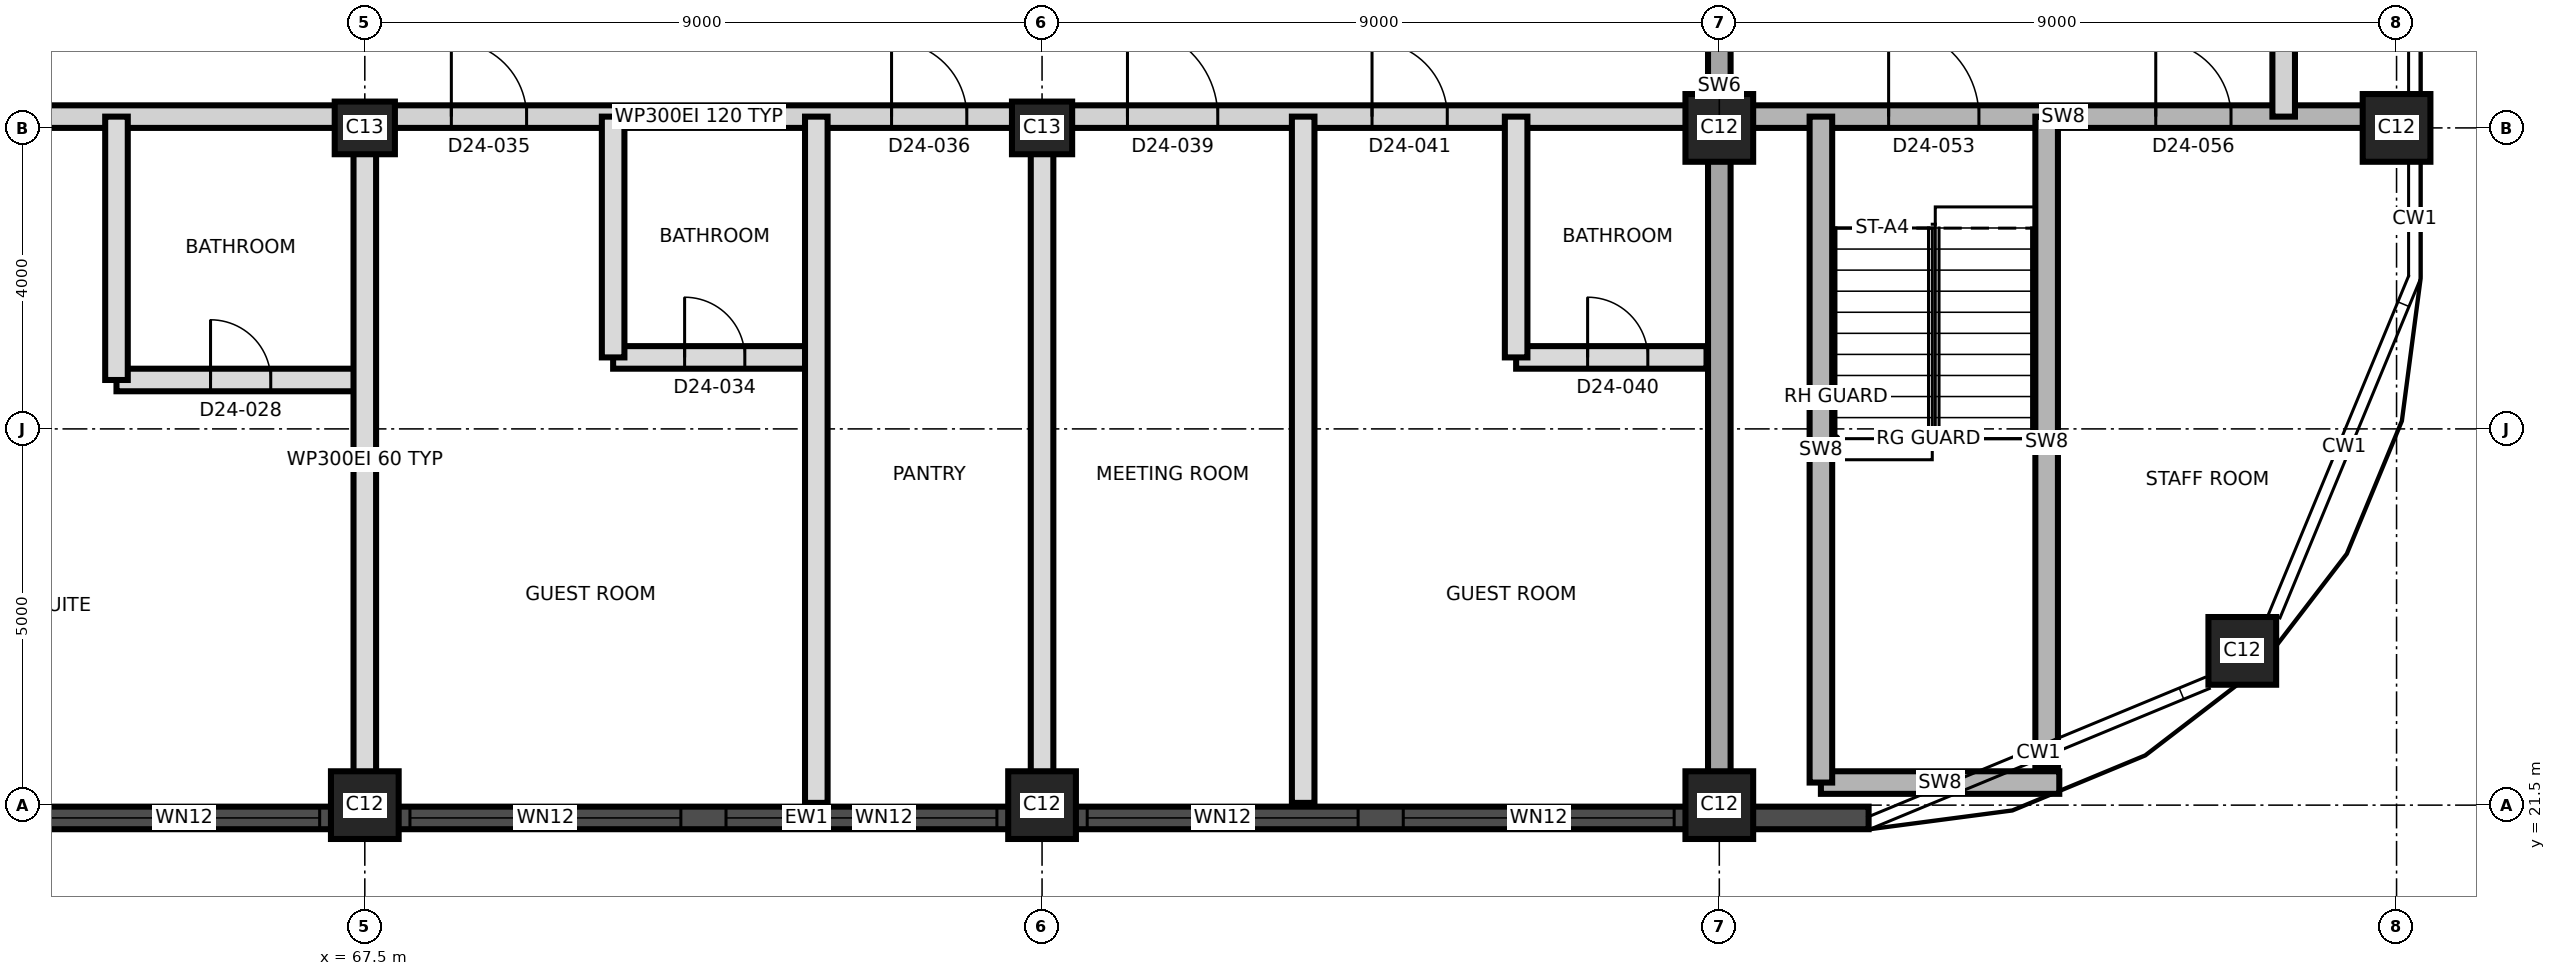
"""IFC4 building model, lengths in metres.
Left out: names, types, materials, properties, quantities, classifications, styles, units other than length and angle.
Written with IfcOpenShell. Run it as: python <this file> out.ifc"""

import sys

from ifc_helpers import new_model, si_unit, direction, frame, frame_2d, origin, origin_2d, place, context, subcontext, project, spatial, rectangle, extrude, element, fill, save


model = new_model("IFC4")
c1 = context("Model", 3, precision=1e-05, world=origin(), true_north=direction((0.0, 1.0)))
c2 = subcontext(c1, "Body", "Model", "MODEL_VIEW")
j1 = project(units=[si_unit("LENGTHUNIT", "METRE"), si_unit("PLANEANGLEUNIT", "RADIAN")], contexts=[c1])
p1 = place(None, origin())
s1 = spatial("IfcSite", under=j1, at=p1, CompositionType="ELEMENT")
p2 = place(p1, origin())
s2 = spatial("IfcBuilding", under=s1, at=p2, CompositionType="ELEMENT")
p3 = place(p2, frame((0.0, 0.0, 214.3)))
s3 = spatial("IfcBuildingStorey", under=s2, at=p3, CompositionType="ELEMENT", Elevation=214.3)
for number, where, z_axis, x_axis in (
    (1, (67.5, 21.5, 0.0), (0.0, 0.0, 1.0), (1.0, 0.0, 0.0)),
    (2, (76.5, 21.5, 0.0), (0.0, 0.0, 1.0), (1.0, 0.0, 0.0)),
    (3, (85.5, 21.5, 0.0), (0.0, 0.0, 1.0), (1.0, 0.0, 0.0)),
    (4, (92.45, 23.55, 0.0), (0.0, 0.0, 1.0), (1.0, 0.0, 0.0)),
):
    element("IfcColumn", number, at=place(p3, frame(where, z_axis=z_axis, x_axis=x_axis)), inside=s3, PredefinedType="COLUMN", context=c2, shape_type="SweptSolid", body=[
        extrude(rectangle(XDim=0.9, YDim=0.9, at=origin_2d()), origin(), (0.0, 0.0, 1.0), 3.7),
    ])
for number, where, z_axis, x_axis in (
    (5, (67.5, 30.5, 0.0), (0.0, 0.0, 1.0), (1.0, 0.0, 0.0)),
    (6, (76.5, 30.5, 0.0), (0.0, 0.0, 1.0), (1.0, 0.0, 0.0)),
):
    element("IfcColumn", number, at=place(p3, frame(where, z_axis=z_axis, x_axis=x_axis)), inside=s3, PredefinedType="COLUMN", context=c2, shape_type="SweptSolid", body=[
        extrude(rectangle(XDim=0.8, YDim=0.7, at=origin_2d()), origin(), (0.0, 0.0, 1.0), 3.7),
    ])
for number, where, z_axis, x_axis in (
    (7, (85.5, 30.5, 0.0), (0.0, 0.0, 1.0), (1.0, 0.0, 0.0)),
    (8, (94.5, 30.5, 0.0), (0.0, 0.0, 1.0), (1.0, 0.0, 0.0)),
):
    element("IfcColumn", number, at=place(p3, frame(where, z_axis=z_axis, x_axis=x_axis)), inside=s3, PredefinedType="COLUMN", context=c2, shape_type="SweptSolid", body=[
        extrude(rectangle(XDim=0.9, YDim=0.9, at=origin_2d()), origin(), (0.0, 0.0, 1.0), 3.7),
    ])
p4 = place(p3, frame((85.5, 21.53, 0.0), z_axis=(0.0, 0.0, 1.0), x_axis=(0.0, 1.0, 0.0)))
e9 = element("IfcWall", 9, at=p4, inside=s3, PredefinedType="SHEAR", context=c2, shape_type="SweptSolid", body=[
    extrude(rectangle(XDim=17.94, YDim=0.3, at=frame_2d((8.97, 0.0))), origin(), (0.0, 0.0, 1.0), 3.7),
])
p5 = place(p4, frame((10.17, 0.0, 0.0)))
e10 = element("IfcOpeningElement", 10, at=p5, cuts=e9, PredefinedType="OPENING", context=c2, shape_type="SweptSolid", body=[
    extrude(rectangle(XDim=1.4, YDim=2.1, at=frame_2d((0.7, 1.05))), frame((0.0, 0.16, 0.0), z_axis=(0.0, -1.0, 0.0), x_axis=(1.0, 0.0, 0.0)), (0.0, 0.0, 1.0), 0.32),
])
p6 = place(p3, frame((59.25, 21.33, 0.0), z_axis=(0.0, 0.0, 1.0), x_axis=(1.0, 0.0, 0.0)))
e11 = element("IfcWall", 11, at=p6, inside=s3, PredefinedType="SOLIDWALL", context=c2, shape_type="SweptSolid", body=[
    extrude(rectangle(XDim=28.234, YDim=0.3, at=frame_2d((14.117, 0.0))), origin(), (0.0, 0.0, 1.0), 3.4),
])
p7 = place(p6, frame((0.975, 0.0, 0.3)))
e12 = element("IfcOpeningElement", 12, at=p7, cuts=e11, PredefinedType="OPENING", context=c2, shape_type="SweptSolid", body=[
    extrude(rectangle(XDim=1.8, YDim=2.4, at=frame_2d((0.9, 1.2))), frame((0.0, 0.16, 0.0), z_axis=(0.0, -1.0, 0.0), x_axis=(1.0, 0.0, 0.0)), (0.0, 0.0, 1.0), 0.32),
])
p8 = place(p6, frame((4.05, 0.0, 0.9)))
e13 = element("IfcOpeningElement", 13, at=p8, cuts=e11, PredefinedType="OPENING", context=c2, shape_type="SweptSolid", body=[
    extrude(rectangle(XDim=3.6, YDim=1.5, at=frame_2d((1.8, 0.75))), frame((0.0, 0.16, 0.0), z_axis=(0.0, -1.0, 0.0), x_axis=(1.0, 0.0, 0.0)), (0.0, 0.0, 1.0), 0.32),
])
p9 = place(p6, frame((8.85, 0.0, 0.9)))
e14 = element("IfcOpeningElement", 14, at=p9, cuts=e11, PredefinedType="OPENING", context=c2, shape_type="SweptSolid", body=[
    extrude(rectangle(XDim=3.6, YDim=1.5, at=frame_2d((1.8, 0.75))), frame((0.0, 0.16, 0.0), z_axis=(0.0, -1.0, 0.0), x_axis=(1.0, 0.0, 0.0)), (0.0, 0.0, 1.0), 0.32),
])
p10 = place(p6, frame((13.05, 0.0, 0.9)))
e15 = element("IfcOpeningElement", 15, at=p10, cuts=e11, PredefinedType="OPENING", context=c2, shape_type="SweptSolid", body=[
    extrude(rectangle(XDim=3.6, YDim=1.5, at=frame_2d((1.8, 0.75))), frame((0.0, 0.16, 0.0), z_axis=(0.0, -1.0, 0.0), x_axis=(1.0, 0.0, 0.0)), (0.0, 0.0, 1.0), 0.32),
])
p11 = place(p6, frame((17.85, 0.0, 0.9)))
e16 = element("IfcOpeningElement", 16, at=p11, cuts=e11, PredefinedType="OPENING", context=c2, shape_type="SweptSolid", body=[
    extrude(rectangle(XDim=3.6, YDim=1.5, at=frame_2d((1.8, 0.75))), frame((0.0, 0.16, 0.0), z_axis=(0.0, -1.0, 0.0), x_axis=(1.0, 0.0, 0.0)), (0.0, 0.0, 1.0), 0.32),
])
p12 = place(p6, frame((22.05, 0.0, 0.9)))
e17 = element("IfcOpeningElement", 17, at=p12, cuts=e11, PredefinedType="OPENING", context=c2, shape_type="SweptSolid", body=[
    extrude(rectangle(XDim=3.6, YDim=1.5, at=frame_2d((1.8, 0.75))), frame((0.0, 0.16, 0.0), z_axis=(0.0, -1.0, 0.0), x_axis=(1.0, 0.0, 0.0)), (0.0, 0.0, 1.0), 0.32),
])
p13 = place(p3, frame((86.85, 21.8, 0.0), z_axis=(0.0, 0.0, 1.0), x_axis=(1.0, 0.0, 0.0)))
e18 = element("IfcWall", 18, at=p13, inside=s3, PredefinedType="SHEAR", context=c2, shape_type="SweptSolid", body=[
    extrude(rectangle(XDim=3.168, YDim=0.3, at=frame_2d((1.584, 0.0))), origin(), (0.0, 0.0, 1.0), 3.4),
])
p14 = place(p3, frame((64.2, 27.15, 0.0), z_axis=(0.0, 0.0, 1.0), x_axis=(1.0, 0.0, 0.0)))
e19 = element("IfcWall", 19, at=p14, inside=s3, PredefinedType="PARTITIONING", context=c2, shape_type="SweptSolid", body=[
    extrude(rectangle(XDim=3.3, YDim=0.3, at=frame_2d((1.65, 0.0))), origin(), (0.0, 0.0, 1.0), 3.4),
])
p15 = place(p14, frame((1.25, 0.0, 0.0)))
e20 = element("IfcOpeningElement", 20, at=p15, cuts=e19, PredefinedType="OPENING", context=c2, shape_type="SweptSolid", body=[
    extrude(rectangle(XDim=0.8, YDim=2.1, at=frame_2d((0.4, 1.05))), frame((0.0, 0.16, 0.0), z_axis=(0.0, -1.0, 0.0), x_axis=(1.0, 0.0, 0.0)), (0.0, 0.0, 1.0), 0.32),
])
p16 = place(p3, frame((70.8, 27.45, 0.0), z_axis=(0.0, 0.0, 1.0), x_axis=(1.0, 0.0, 0.0)))
e21 = element("IfcWall", 21, at=p16, inside=s3, PredefinedType="PARTITIONING", context=c2, shape_type="SweptSolid", body=[
    extrude(rectangle(XDim=2.7, YDim=0.3, at=frame_2d((1.35, 0.0))), origin(), (0.0, 0.0, 1.0), 3.4),
])
p17 = place(p16, frame((0.95, 0.0, 0.0)))
e22 = element("IfcOpeningElement", 22, at=p17, cuts=e21, PredefinedType="OPENING", context=c2, shape_type="SweptSolid", body=[
    extrude(rectangle(XDim=0.8, YDim=2.1, at=frame_2d((0.4, 1.05))), frame((0.0, 0.16, 0.0), z_axis=(0.0, -1.0, 0.0), x_axis=(1.0, 0.0, 0.0)), (0.0, 0.0, 1.0), 0.32),
])
p18 = place(p3, frame((82.8, 27.45, 0.0), z_axis=(0.0, 0.0, 1.0), x_axis=(1.0, 0.0, 0.0)))
e23 = element("IfcWall", 23, at=p18, inside=s3, PredefinedType="PARTITIONING", context=c2, shape_type="SweptSolid", body=[
    extrude(rectangle(XDim=2.53, YDim=0.3, at=frame_2d((1.265, 0.0))), origin(), (0.0, 0.0, 1.0), 3.4),
])
p19 = place(p18, frame((0.95, 0.0, 0.0)))
e24 = element("IfcOpeningElement", 24, at=p19, cuts=e23, PredefinedType="OPENING", context=c2, shape_type="SweptSolid", body=[
    extrude(rectangle(XDim=0.8, YDim=2.1, at=frame_2d((0.4, 1.05))), frame((0.0, 0.16, 0.0), z_axis=(0.0, -1.0, 0.0), x_axis=(1.0, 0.0, 0.0)), (0.0, 0.0, 1.0), 0.32),
])
p20 = place(p3, frame((58.55, 30.65, 0.0), z_axis=(0.0, 0.0, 1.0), x_axis=(1.0, 0.0, 0.0)))
e25 = element("IfcWall", 25, at=p20, inside=s3, PredefinedType="PARTITIONING", context=c2, shape_type="SweptSolid", body=[
    extrude(rectangle(XDim=26.78, YDim=0.3, at=frame_2d((13.39, 0.0))), origin(), (0.0, 0.0, 1.0), 3.4),
])
p21 = place(p20, frame((2.3, 0.0, 0.0)))
e26 = element("IfcOpeningElement", 26, at=p21, cuts=e25, PredefinedType="OPENING", context=c2, shape_type="SweptSolid", body=[
    extrude(rectangle(XDim=1.0, YDim=2.4, at=frame_2d((0.5, 1.2))), frame((0.0, 0.16, 0.0), z_axis=(0.0, -1.0, 0.0), x_axis=(1.0, 0.0, 0.0)), (0.0, 0.0, 1.0), 0.32),
])
p22 = place(p20, frame((10.1, 0.0, 0.0)))
e27 = element("IfcOpeningElement", 27, at=p22, cuts=e25, PredefinedType="OPENING", context=c2, shape_type="SweptSolid", body=[
    extrude(rectangle(XDim=1.0, YDim=2.1, at=frame_2d((0.5, 1.05))), frame((0.0, 0.16, 0.0), z_axis=(0.0, -1.0, 0.0), x_axis=(1.0, 0.0, 0.0)), (0.0, 0.0, 1.0), 0.32),
])
p23 = place(p20, frame((15.95, 0.0, 0.0)))
e28 = element("IfcOpeningElement", 28, at=p23, cuts=e25, PredefinedType="OPENING", context=c2, shape_type="SweptSolid", body=[
    extrude(rectangle(XDim=1.0, YDim=2.1, at=frame_2d((0.5, 1.05))), frame((0.0, 0.16, 0.0), z_axis=(0.0, -1.0, 0.0), x_axis=(1.0, 0.0, 0.0)), (0.0, 0.0, 1.0), 0.32),
])
p24 = place(p20, frame((19.085, 0.0, 0.0)))
e29 = element("IfcOpeningElement", 29, at=p24, cuts=e25, PredefinedType="OPENING", context=c2, shape_type="SweptSolid", body=[
    extrude(rectangle(XDim=1.2, YDim=2.1, at=frame_2d((0.6, 1.05))), frame((0.0, 0.16, 0.0), z_axis=(0.0, -1.0, 0.0), x_axis=(1.0, 0.0, 0.0)), (0.0, 0.0, 1.0), 0.32),
])
p25 = place(p20, frame((22.335, 0.0, 0.0)))
e30 = element("IfcOpeningElement", 30, at=p25, cuts=e25, PredefinedType="OPENING", context=c2, shape_type="SweptSolid", body=[
    extrude(rectangle(XDim=1.0, YDim=2.1, at=frame_2d((0.5, 1.05))), frame((0.0, 0.16, 0.0), z_axis=(0.0, -1.0, 0.0), x_axis=(1.0, 0.0, 0.0)), (0.0, 0.0, 1.0), 0.32),
])
p26 = place(p3, frame((85.67, 30.65, 0.0), z_axis=(0.0, 0.0, 1.0), x_axis=(1.0, 0.0, 0.0)))
e31 = element("IfcWall", 31, at=p26, inside=s3, PredefinedType="SHEAR", context=c2, shape_type="SweptSolid", body=[
    extrude(rectangle(XDim=8.8, YDim=0.3, at=frame_2d((4.4, 0.0))), origin(), (0.0, 0.0, 1.0), 3.4),
])
p27 = place(p26, frame((2.08, 0.0, 0.0)))
e32 = element("IfcOpeningElement", 32, at=p27, cuts=e31, PredefinedType="OPENING", context=c2, shape_type="SweptSolid", body=[
    extrude(rectangle(XDim=1.2, YDim=2.1, at=frame_2d((0.6, 1.05))), frame((0.0, 0.16, 0.0), z_axis=(0.0, -1.0, 0.0), x_axis=(1.0, 0.0, 0.0)), (0.0, 0.0, 1.0), 0.32),
])
p28 = place(p26, frame((5.63, 0.0, 0.0)))
e33 = element("IfcOpeningElement", 33, at=p28, cuts=e31, PredefinedType="OPENING", context=c2, shape_type="SweptSolid", body=[
    extrude(rectangle(XDim=1.0, YDim=2.1, at=frame_2d((0.5, 1.05))), frame((0.0, 0.16, 0.0), z_axis=(0.0, -1.0, 0.0), x_axis=(1.0, 0.0, 0.0)), (0.0, 0.0, 1.0), 0.32),
])
p29 = place(p3, frame((64.2, 27.15, 0.0), z_axis=(0.0, 0.0, 1.0), x_axis=(0.0, 1.0, 0.0)))
e34 = element("IfcWall", 34, at=p29, inside=s3, PredefinedType="PARTITIONING", context=c2, shape_type="SweptSolid", body=[
    extrude(rectangle(XDim=3.5, YDim=0.3, at=frame_2d((1.75, 0.0))), origin(), (0.0, 0.0, 1.0), 3.4),
])
p30 = place(p3, frame((67.5, 21.53, 0.0), z_axis=(0.0, 0.0, 1.0), x_axis=(0.0, 1.0, 0.0)))
e35 = element("IfcWall", 35, at=p30, inside=s3, PredefinedType="PARTITIONING", context=c2, shape_type="SweptSolid", body=[
    extrude(rectangle(XDim=9.12, YDim=0.3, at=frame_2d((4.56, 0.0))), origin(), (0.0, 0.0, 1.0), 3.4),
])
p31 = place(p3, frame((70.8, 27.45, 0.0), z_axis=(0.0, 0.0, 1.0), x_axis=(0.0, 1.0, 0.0)))
e36 = element("IfcWall", 36, at=p31, inside=s3, PredefinedType="PARTITIONING", context=c2, shape_type="SweptSolid", body=[
    extrude(rectangle(XDim=3.2, YDim=0.3, at=frame_2d((1.6, 0.0))), origin(), (0.0, 0.0, 1.0), 3.4),
])
for number, where, z_axis, x_axis in (
    (37, (73.5, 21.53, 0.0), (0.0, 0.0, 1.0), (0.0, 1.0, 0.0)),
    (38, (76.5, 21.53, 0.0), (0.0, 0.0, 1.0), (0.0, 1.0, 0.0)),
    (39, (79.97, 21.53, 0.0), (0.0, 0.0, 1.0), (0.0, 1.0, 0.0)),
):
    element("IfcWall", number, at=place(p3, frame(where, z_axis=z_axis, x_axis=x_axis)), inside=s3, PredefinedType="PARTITIONING", context=c2, shape_type="SweptSolid", body=[
        extrude(rectangle(XDim=9.12, YDim=0.3, at=frame_2d((4.56, 0.0))), origin(), (0.0, 0.0, 1.0), 3.4),
    ])
p32 = place(p3, frame((82.8, 27.45, 0.0), z_axis=(0.0, 0.0, 1.0), x_axis=(0.0, 1.0, 0.0)))
e40 = element("IfcWall", 40, at=p32, inside=s3, PredefinedType="PARTITIONING", context=c2, shape_type="SweptSolid", body=[
    extrude(rectangle(XDim=3.2, YDim=0.3, at=frame_2d((1.6, 0.0))), origin(), (0.0, 0.0, 1.0), 3.4),
])
p33 = place(p3, frame((86.85, 21.8, 0.0), z_axis=(0.0, 0.0, 1.0), x_axis=(0.0, 1.0, 0.0)))
e41 = element("IfcWall", 41, at=p33, inside=s3, PredefinedType="SHEAR", context=c2, shape_type="SweptSolid", body=[
    extrude(rectangle(XDim=8.85, YDim=0.3, at=frame_2d((4.425, 0.0))), origin(), (0.0, 0.0, 1.0), 3.4),
])
p34 = place(p3, frame((89.85, 21.997, 0.0), z_axis=(0.0, 0.0, 1.0), x_axis=(0.0, 1.0, 0.0)))
e42 = element("IfcWall", 42, at=p34, inside=s3, PredefinedType="SHEAR", context=c2, shape_type="SweptSolid", body=[
    extrude(rectangle(XDim=8.653, YDim=0.3, at=frame_2d((4.326, 0.0))), origin(), (0.0, 0.0, 1.0), 3.4),
])
p35 = place(p3, frame((93.0, 30.65, 0.0), z_axis=(0.0, 0.0, 1.0), x_axis=(0.0, 1.0, 0.0)))
e43 = element("IfcWall", 43, at=p35, inside=s3, PredefinedType="PARTITIONING", context=c2, shape_type="SweptSolid", body=[
    extrude(rectangle(XDim=2.7, YDim=0.3, at=frame_2d((1.35, 0.0))), origin(), (0.0, 0.0, 1.0), 3.4),
])
p36 = place(p8, origin())
e44 = element("IfcWindow", 44, at=p36, inside=s3, PartitioningType="SINGLE_PANEL", PredefinedType="WINDOW", context=c2, shape_type="SweptSolid", body=[
    extrude(rectangle(XDim=3.6, YDim=1.5, at=frame_2d((1.8, 0.75))), frame((0.0, 0.03, 0.0), z_axis=(0.0, -1.0, 0.0), x_axis=(1.0, 0.0, 0.0)), (0.0, 0.0, 1.0), 0.06),
])
fill(e13, e44)
p37 = place(p9, origin())
e45 = element("IfcWindow", 45, at=p37, inside=s3, PartitioningType="SINGLE_PANEL", PredefinedType="WINDOW", context=c2, shape_type="SweptSolid", body=[
    extrude(rectangle(XDim=3.6, YDim=1.5, at=frame_2d((1.8, 0.75))), frame((0.0, 0.03, 0.0), z_axis=(0.0, -1.0, 0.0), x_axis=(1.0, 0.0, 0.0)), (0.0, 0.0, 1.0), 0.06),
])
fill(e14, e45)
p38 = place(p10, origin())
e46 = element("IfcWindow", 46, at=p38, inside=s3, PartitioningType="SINGLE_PANEL", PredefinedType="WINDOW", context=c2, shape_type="SweptSolid", body=[
    extrude(rectangle(XDim=3.6, YDim=1.5, at=frame_2d((1.8, 0.75))), frame((0.0, 0.03, 0.0), z_axis=(0.0, -1.0, 0.0), x_axis=(1.0, 0.0, 0.0)), (0.0, 0.0, 1.0), 0.06),
])
fill(e15, e46)
p39 = place(p11, origin())
e47 = element("IfcWindow", 47, at=p39, inside=s3, PartitioningType="SINGLE_PANEL", PredefinedType="WINDOW", context=c2, shape_type="SweptSolid", body=[
    extrude(rectangle(XDim=3.6, YDim=1.5, at=frame_2d((1.8, 0.75))), frame((0.0, 0.03, 0.0), z_axis=(0.0, -1.0, 0.0), x_axis=(1.0, 0.0, 0.0)), (0.0, 0.0, 1.0), 0.06),
])
fill(e16, e47)
p40 = place(p12, origin())
e48 = element("IfcWindow", 48, at=p40, inside=s3, PartitioningType="SINGLE_PANEL", PredefinedType="WINDOW", context=c2, shape_type="SweptSolid", body=[
    extrude(rectangle(XDim=3.6, YDim=1.5, at=frame_2d((1.8, 0.75))), frame((0.0, 0.03, 0.0), z_axis=(0.0, -1.0, 0.0), x_axis=(1.0, 0.0, 0.0)), (0.0, 0.0, 1.0), 0.06),
])
fill(e17, e48)
p41 = place(p15, origin())
e49 = element("IfcDoor", 49, at=p41, inside=s3, OperationType="SINGLE_SWING_LEFT", PredefinedType="DOOR", context=c2, shape_type="SweptSolid", body=[
    extrude(rectangle(XDim=0.8, YDim=2.1, at=frame_2d((0.4, 1.05))), frame((0.0, 0.025, 0.0), z_axis=(0.0, -1.0, 0.0), x_axis=(1.0, 0.0, 0.0)), (0.0, 0.0, 1.0), 0.05),
])
fill(e20, e49)
p42 = place(p17, origin())
e50 = element("IfcDoor", 50, at=p42, inside=s3, OperationType="SINGLE_SWING_LEFT", PredefinedType="DOOR", context=c2, shape_type="SweptSolid", body=[
    extrude(rectangle(XDim=0.8, YDim=2.1, at=frame_2d((0.4, 1.05))), frame((0.0, 0.025, 0.0), z_axis=(0.0, -1.0, 0.0), x_axis=(1.0, 0.0, 0.0)), (0.0, 0.0, 1.0), 0.05),
])
fill(e22, e50)
p43 = place(p22, origin())
e51 = element("IfcDoor", 51, at=p43, inside=s3, OperationType="SINGLE_SWING_LEFT", PredefinedType="DOOR", context=c2, shape_type="SweptSolid", body=[
    extrude(rectangle(XDim=1.0, YDim=2.1, at=frame_2d((0.5, 1.05))), frame((0.0, 0.025, 0.0), z_axis=(0.0, -1.0, 0.0), x_axis=(1.0, 0.0, 0.0)), (0.0, 0.0, 1.0), 0.05),
])
fill(e27, e51)
p44 = place(p23, origin())
e52 = element("IfcDoor", 52, at=p44, inside=s3, OperationType="SINGLE_SWING_RIGHT", PredefinedType="DOOR", context=c2, shape_type="SweptSolid", body=[
    extrude(rectangle(XDim=1.0, YDim=2.1, at=frame_2d((0.5, 1.05))), frame((0.0, 0.025, 0.0), z_axis=(0.0, -1.0, 0.0), x_axis=(1.0, 0.0, 0.0)), (0.0, 0.0, 1.0), 0.05),
])
fill(e28, e52)
p45 = place(p24, origin())
e53 = element("IfcDoor", 53, at=p45, inside=s3, OperationType="SINGLE_SWING_RIGHT", PredefinedType="DOOR", context=c2, shape_type="SweptSolid", body=[
    extrude(rectangle(XDim=1.2, YDim=2.1, at=frame_2d((0.6, 1.05))), frame((0.0, 0.025, 0.0), z_axis=(0.0, -1.0, 0.0), x_axis=(1.0, 0.0, 0.0)), (0.0, 0.0, 1.0), 0.05),
])
fill(e29, e53)
p46 = place(p19, origin())
e54 = element("IfcDoor", 54, at=p46, inside=s3, OperationType="SINGLE_SWING_LEFT", PredefinedType="DOOR", context=c2, shape_type="SweptSolid", body=[
    extrude(rectangle(XDim=0.8, YDim=2.1, at=frame_2d((0.4, 1.05))), frame((0.0, 0.025, 0.0), z_axis=(0.0, -1.0, 0.0), x_axis=(1.0, 0.0, 0.0)), (0.0, 0.0, 1.0), 0.05),
])
fill(e24, e54)
p47 = place(p25, origin())
e55 = element("IfcDoor", 55, at=p47, inside=s3, OperationType="SINGLE_SWING_LEFT", PredefinedType="DOOR", context=c2, shape_type="SweptSolid", body=[
    extrude(rectangle(XDim=1.0, YDim=2.1, at=frame_2d((0.5, 1.05))), frame((0.0, 0.025, 0.0), z_axis=(0.0, -1.0, 0.0), x_axis=(1.0, 0.0, 0.0)), (0.0, 0.0, 1.0), 0.05),
])
fill(e30, e55)
p48 = place(p27, origin())
e56 = element("IfcDoor", 56, at=p48, inside=s3, OperationType="SINGLE_SWING_LEFT", PredefinedType="DOOR", context=c2, shape_type="SweptSolid", body=[
    extrude(rectangle(XDim=1.2, YDim=2.1, at=frame_2d((0.6, 1.05))), frame((0.0, 0.025, 0.0), z_axis=(0.0, -1.0, 0.0), x_axis=(1.0, 0.0, 0.0)), (0.0, 0.0, 1.0), 0.05),
])
fill(e32, e56)
p49 = place(p28, origin())
e57 = element("IfcDoor", 57, at=p49, inside=s3, OperationType="SINGLE_SWING_LEFT", PredefinedType="DOOR", context=c2, shape_type="SweptSolid", body=[
    extrude(rectangle(XDim=1.0, YDim=2.1, at=frame_2d((0.5, 1.05))), frame((0.0, 0.025, 0.0), z_axis=(0.0, -1.0, 0.0), x_axis=(1.0, 0.0, 0.0)), (0.0, 0.0, 1.0), 0.05),
])
fill(e33, e57)
save(model, sys.argv[1])
